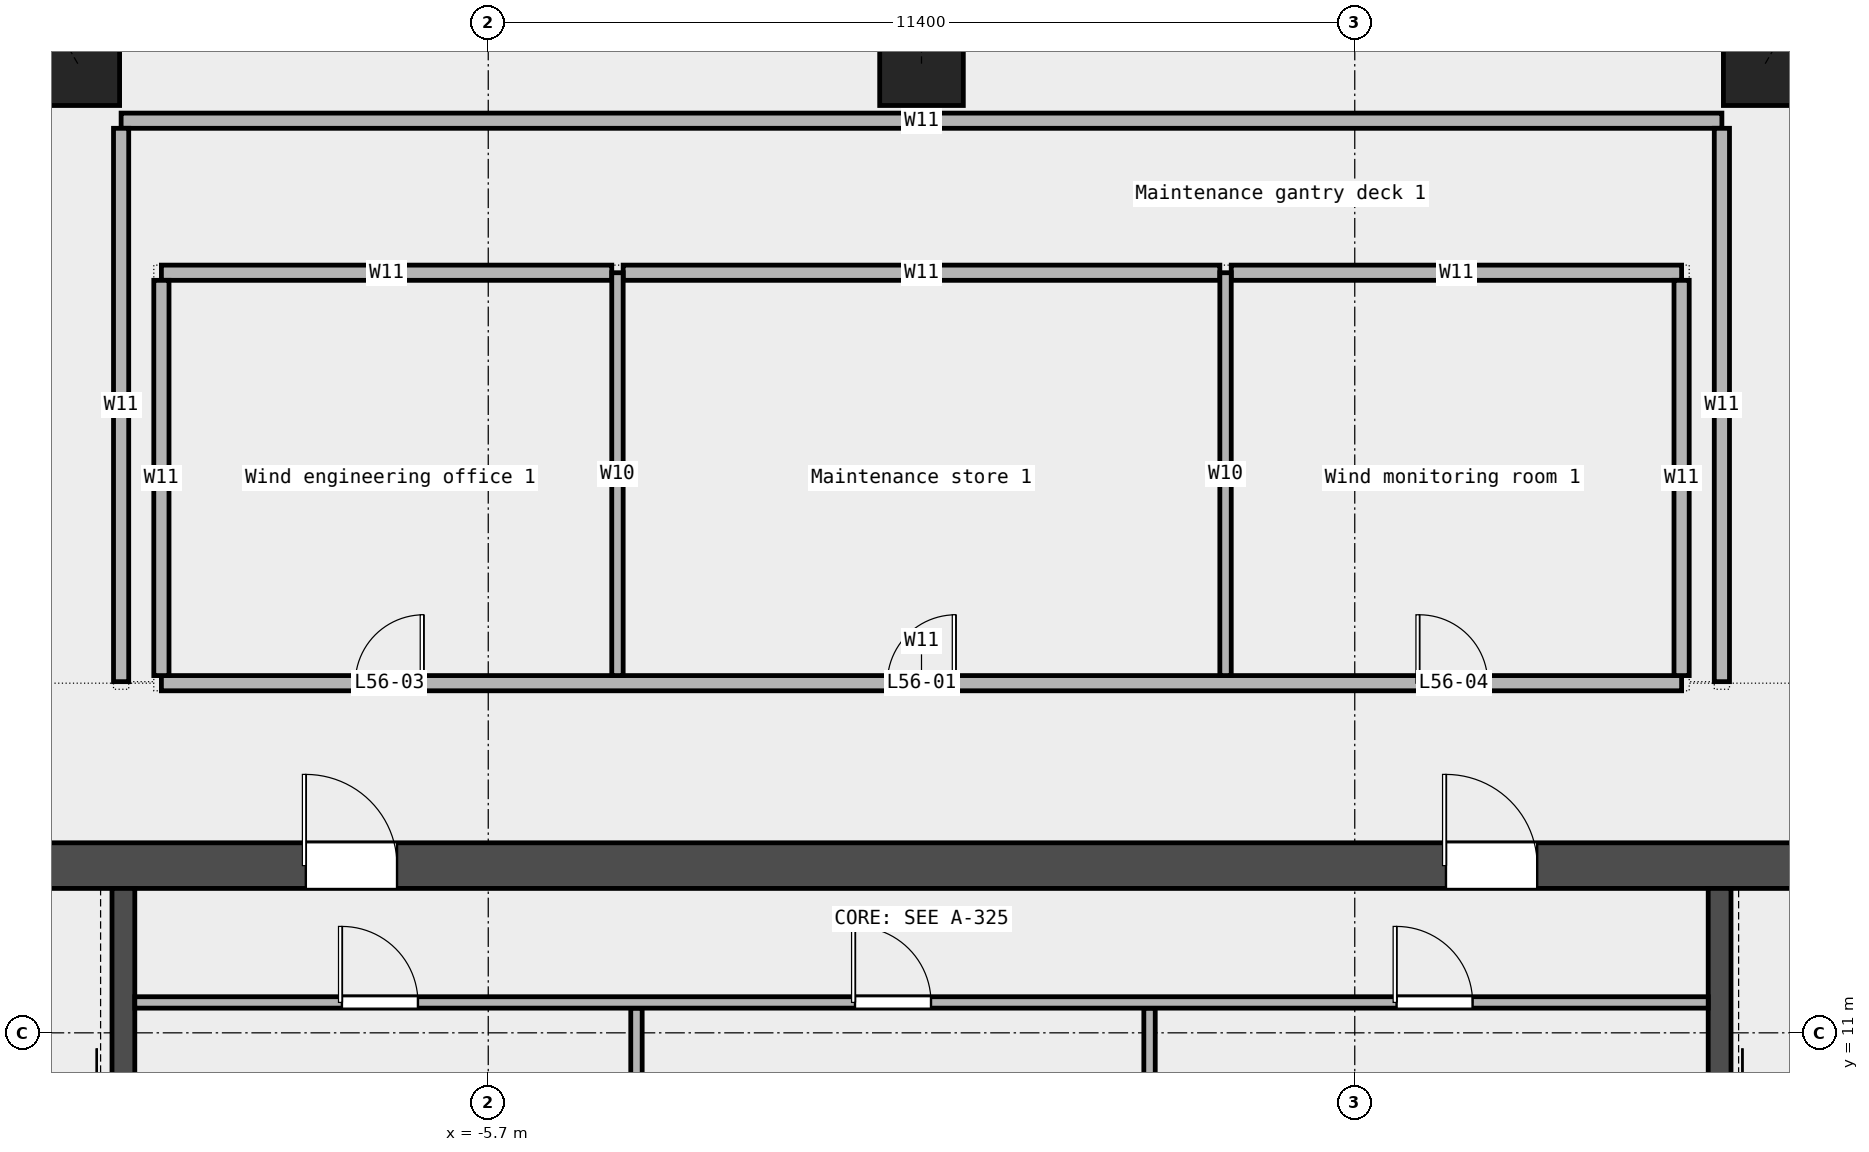
"""IFC4 building model, lengths in metres.
Left out: names, types, materials, properties, quantities, classifications, styles, units other than length and angle.
Written with IfcOpenShell. Run it as: python <this file> out.ifc"""

import sys

from ifc_helpers import new_model, si_unit, direction, frame, frame_2d, origin, origin_2d, place, context, subcontext, project, spatial, rectangle, extrude, element, fill, save


model = new_model("IFC4")
c1 = context("Model", 3, precision=1e-05, world=origin(), true_north=direction((0.0, 1.0)))
c2 = subcontext(c1, "Body", "Model", "MODEL_VIEW")
j1 = project(units=[si_unit("LENGTHUNIT", "METRE"), si_unit("PLANEANGLEUNIT", "RADIAN")], contexts=[c1])
p1 = place(None, origin())
s1 = spatial("IfcSite", under=j1, at=p1, CompositionType="ELEMENT")
p2 = place(p1, origin())
s2 = spatial("IfcBuilding", under=s1, at=p2, CompositionType="ELEMENT")
p3 = place(p2, frame((0.0, 0.0, 259.0)))
s3 = spatial("IfcBuildingStorey", under=s2, at=p3, CompositionType="ELEMENT", Elevation=259.0)
p4 = place(p3, frame((11.1, 23.75, 0.0), z_axis=(0.085054467071, 0.146649781273, 0.985525027224), x_axis=(-0.865037348799, 0.50170746973, 0.0)))
e1 = element("IfcColumn", 1, at=p4, inside=s3, PredefinedType="COLUMN", context=c2, shape_type="SweptSolid", body=[
    extrude(rectangle(XDim=1.1, YDim=1.1, at=origin_2d()), origin(), (0.0, 0.0, 1.0), 8.117),
])
p5 = place(p3, frame((0.0, 23.75, 0.0), z_axis=(0.0, 0.1471831283, 0.989109259255), x_axis=(-1.0, 0.0, 0.0)))
e2 = element("IfcColumn", 2, at=p5, inside=s3, PredefinedType="COLUMN", context=c2, shape_type="SweptSolid", body=[
    extrude(rectangle(XDim=1.1, YDim=1.1, at=origin_2d()), origin(), (0.0, 0.0, 1.0), 8.088),
])
p6 = place(p3, frame((-11.1, 23.75, 0.0), z_axis=(-0.085054467071, 0.146649781273, 0.985525027224), x_axis=(-0.865037348799, -0.50170746973, 0.0)))
e3 = element("IfcColumn", 3, at=p6, inside=s3, PredefinedType="COLUMN", context=c2, shape_type="SweptSolid", body=[
    extrude(rectangle(XDim=1.1, YDim=1.1, at=origin_2d()), origin(), (0.0, 0.0, 1.0), 8.117),
])
p7 = place(p3, frame((-10.0, 15.6, 0.0), z_axis=(0.0, 0.0, 1.0), x_axis=(1.0, 0.0, 0.0)))
e4 = element("IfcWall", 4, at=p7, inside=s3, PredefinedType="PARTITIONING", context=c2, shape_type="SweptSolid", body=[
    extrude(rectangle(XDim=20.0, YDim=0.2, at=frame_2d((10.0, 0.0))), origin(), (0.0, 0.0, 1.0), 8.0),
])
p8 = place(p7, frame((9.55, 0.0, 0.0)))
e5 = element("IfcOpeningElement", 5, at=p8, cuts=e4, PredefinedType="OPENING", context=c2, shape_type="SweptSolid", body=[
    extrude(rectangle(XDim=0.9, YDim=2.1, at=frame_2d((0.45, 1.05))), frame((0.0, 0.112, 0.0), z_axis=(0.0, -1.0, 0.0), x_axis=(1.0, 0.0, 0.0)), (0.0, 0.0, 1.0), 0.224),
])
p9 = place(p7, frame((2.55, 0.0, 0.0)))
e6 = element("IfcOpeningElement", 6, at=p9, cuts=e4, PredefinedType="OPENING", context=c2, shape_type="SweptSolid", body=[
    extrude(rectangle(XDim=0.9, YDim=2.1, at=frame_2d((0.45, 1.05))), frame((0.0, 0.112, 0.0), z_axis=(0.0, -1.0, 0.0), x_axis=(1.0, 0.0, 0.0)), (0.0, 0.0, 1.0), 0.224),
])
p10 = place(p7, frame((16.55, 0.0, 0.0)))
e7 = element("IfcOpeningElement", 7, at=p10, cuts=e4, PredefinedType="OPENING", context=c2, shape_type="SweptSolid", body=[
    extrude(rectangle(XDim=0.9, YDim=2.1, at=frame_2d((0.45, 1.05))), frame((0.0, 0.112, 0.0), z_axis=(0.0, -1.0, 0.0), x_axis=(1.0, 0.0, 0.0)), (0.0, 0.0, 1.0), 0.224),
])
p11 = place(p3, frame((-10.0, 21.0, 0.0), z_axis=(0.0, 0.0, 1.0), x_axis=(1.0, 0.0, 0.0)))
e8 = element("IfcWall", 8, at=p11, inside=s3, PredefinedType="PARTITIONING", context=c2, shape_type="SweptSolid", body=[
    extrude(rectangle(XDim=5.925, YDim=0.2, at=frame_2d((2.962, 0.0))), origin(), (0.0, 0.0, 1.0), 8.0),
])
p12 = place(p3, frame((-3.925, 21.0, 0.0), z_axis=(0.0, 0.0, 1.0), x_axis=(1.0, 0.0, 0.0)))
e9 = element("IfcWall", 9, at=p12, inside=s3, PredefinedType="PARTITIONING", context=c2, shape_type="SweptSolid", body=[
    extrude(rectangle(XDim=7.85, YDim=0.2, at=frame_2d((3.925, 0.0))), origin(), (0.0, 0.0, 1.0), 8.0),
])
p13 = place(p3, frame((4.075, 21.0, 0.0), z_axis=(0.0, 0.0, 1.0), x_axis=(1.0, 0.0, 0.0)))
e10 = element("IfcWall", 10, at=p13, inside=s3, PredefinedType="PARTITIONING", context=c2, shape_type="SweptSolid", body=[
    extrude(rectangle(XDim=5.925, YDim=0.2, at=frame_2d((2.962, 0.0))), origin(), (0.0, 0.0, 1.0), 8.0),
])
p14 = place(p3, frame((-10.53, 23.0, 0.0), z_axis=(0.0, 0.0, 1.0), x_axis=(1.0, 0.0, 0.0)))
e11 = element("IfcWall", 11, at=p14, inside=s3, PredefinedType="PARTITIONING", context=c2, shape_type="SweptSolid", body=[
    extrude(rectangle(XDim=21.06, YDim=0.2, at=frame_2d((10.53, 0.0))), origin(), (0.0, 0.0, 1.0), 8.0),
])
p15 = place(p3, frame((-10.53, 15.62, 0.0), z_axis=(0.0, 0.0, 1.0), x_axis=(0.0, 1.0, 0.0)))
e12 = element("IfcWall", 12, at=p15, inside=s3, PredefinedType="PARTITIONING", context=c2, shape_type="SweptSolid", body=[
    extrude(rectangle(XDim=7.28, YDim=0.2, at=frame_2d((3.64, 0.0))), origin(), (0.0, 0.0, 1.0), 8.0),
])
p16 = place(p3, frame((-10.0, 15.7, 0.0), z_axis=(0.0, 0.0, 1.0), x_axis=(0.0, 1.0, 0.0)))
e13 = element("IfcWall", 13, at=p16, inside=s3, PredefinedType="PARTITIONING", context=c2, shape_type="SweptSolid", body=[
    extrude(rectangle(XDim=5.2, YDim=0.2, at=frame_2d((2.6, 0.0))), origin(), (0.0, 0.0, 1.0), 8.0),
])
for number, where, z_axis, x_axis in (
    (14, (-4.0, 15.7, 0.0), (0.0, 0.0, 1.0), (0.0, 1.0, 0.0)),
    (15, (4.0, 15.7, 0.0), (0.0, 0.0, 1.0), (0.0, 1.0, 0.0)),
):
    element("IfcWall", number, at=place(p3, frame(where, z_axis=z_axis, x_axis=x_axis)), inside=s3, PredefinedType="PARTITIONING", context=c2, shape_type="SweptSolid", body=[
        extrude(rectangle(XDim=5.3, YDim=0.15, at=frame_2d((2.65, 0.0))), origin(), (0.0, 0.0, 1.0), 8.0),
    ])
p17 = place(p3, frame((10.0, 15.7, 0.0), z_axis=(0.0, 0.0, 1.0), x_axis=(0.0, 1.0, 0.0)))
e16 = element("IfcWall", 16, at=p17, inside=s3, PredefinedType="PARTITIONING", context=c2, shape_type="SweptSolid", body=[
    extrude(rectangle(XDim=5.2, YDim=0.2, at=frame_2d((2.6, 0.0))), origin(), (0.0, 0.0, 1.0), 8.0),
])
p18 = place(p3, frame((10.53, 15.62, 0.0), z_axis=(0.0, 0.0, 1.0), x_axis=(0.0, 1.0, 0.0)))
e17 = element("IfcWall", 17, at=p18, inside=s3, PredefinedType="PARTITIONING", context=c2, shape_type="SweptSolid", body=[
    extrude(rectangle(XDim=7.28, YDim=0.2, at=frame_2d((3.64, 0.0))), origin(), (0.0, 0.0, 1.0), 8.0),
])
p19 = place(p3, frame((-14.4, 13.2, 0.0), z_axis=(0.0, 0.0, 1.0), x_axis=(1.0, 0.0, 0.0)))
e18 = element("IfcWall", 18, at=p19, inside=s3, PredefinedType="SHEAR", context=c2, shape_type="SweptSolid", body=[
    extrude(rectangle(XDim=28.8, YDim=0.6, at=frame_2d((14.4, 0.0))), origin(), (0.0, 0.0, 1.0), 8.1),
])
p20 = place(p19, frame((6.3, 0.0, 0.0)))
e19 = element("IfcOpeningElement", 19, at=p20, cuts=e18, PredefinedType="OPENING", context=c2, shape_type="SweptSolid", body=[
    extrude(rectangle(XDim=1.2, YDim=2.1, at=frame_2d((0.6, 1.05))), frame((0.0, 0.312, 0.0), z_axis=(0.0, -1.0, 0.0), x_axis=(1.0, 0.0, 0.0)), (0.0, 0.0, 1.0), 0.624),
])
p21 = place(p19, frame((21.3, 0.0, 0.0)))
e20 = element("IfcOpeningElement", 20, at=p21, cuts=e18, PredefinedType="OPENING", context=c2, shape_type="SweptSolid", body=[
    extrude(rectangle(XDim=1.2, YDim=2.1, at=frame_2d((0.6, 1.05))), frame((0.0, 0.312, 0.0), z_axis=(0.0, -1.0, 0.0), x_axis=(1.0, 0.0, 0.0)), (0.0, 0.0, 1.0), 0.624),
])
for number, where, z_axis, x_axis in (
    (21, (-10.5, 5.25, 0.0), (0.0, 0.0, 1.0), (0.0, 1.0, 0.0)),
    (22, (10.5, 5.25, 0.0), (0.0, 0.0, 1.0), (0.0, 1.0, 0.0)),
):
    element("IfcWall", number, at=place(p3, frame(where, z_axis=z_axis, x_axis=x_axis)), inside=s3, PredefinedType="SHEAR", context=c2, shape_type="SweptSolid", body=[
        extrude(rectangle(XDim=7.65, YDim=0.3, at=frame_2d((3.825, 0.0))), origin(), (0.0, 0.0, 1.0), 8.1),
    ])
for number, where, z_axis, x_axis in (
    (23, (-3.75, 8.55, 0.0), (0.0, 0.0, 1.0), (0.0, 1.0, 0.0)),
    (24, (3.0, 8.55, 0.0), (0.0, 0.0, 1.0), (0.0, 1.0, 0.0)),
):
    element("IfcWall", number, at=place(p3, frame(where, z_axis=z_axis, x_axis=x_axis)), inside=s3, PredefinedType="PARTITIONING", context=c2, shape_type="SweptSolid", body=[
        extrude(rectangle(XDim=2.775, YDim=0.15, at=frame_2d((1.387, 0.0))), origin(), (0.0, 0.0, 1.0), 8.1),
    ])
p22 = place(p3, frame((-10.35, 11.4, 0.0), z_axis=(0.0, 0.0, 1.0), x_axis=(1.0, 0.0, 0.0)))
e25 = element("IfcWall", 25, at=p22, inside=s3, PredefinedType="PARTITIONING", context=c2, shape_type="SweptSolid", body=[
    extrude(rectangle(XDim=20.7, YDim=0.15, at=frame_2d((10.35, 0.0))), origin(), (0.0, 0.0, 1.0), 8.1),
])
p23 = place(p22, frame((2.725, 0.0, 0.0)))
e26 = element("IfcOpeningElement", 26, at=p23, cuts=e25, PredefinedType="OPENING", context=c2, shape_type="SweptSolid", body=[
    extrude(rectangle(XDim=1.0, YDim=2.1, at=frame_2d((0.5, 1.05))), frame((0.0, 0.087, 0.0), z_axis=(0.0, -1.0, 0.0), x_axis=(1.0, 0.0, 0.0)), (0.0, 0.0, 1.0), 0.174),
])
p24 = place(p22, frame((9.475, 0.0, 0.0)))
e27 = element("IfcOpeningElement", 27, at=p24, cuts=e25, PredefinedType="OPENING", context=c2, shape_type="SweptSolid", body=[
    extrude(rectangle(XDim=1.0, YDim=2.1, at=frame_2d((0.5, 1.05))), frame((0.0, 0.087, 0.0), z_axis=(0.0, -1.0, 0.0), x_axis=(1.0, 0.0, 0.0)), (0.0, 0.0, 1.0), 0.174),
])
p25 = place(p22, frame((16.6, 0.0, 0.0)))
e28 = element("IfcOpeningElement", 28, at=p25, cuts=e25, PredefinedType="OPENING", context=c2, shape_type="SweptSolid", body=[
    extrude(rectangle(XDim=1.0, YDim=2.1, at=frame_2d((0.5, 1.05))), frame((0.0, 0.087, 0.0), z_axis=(0.0, -1.0, 0.0), x_axis=(1.0, 0.0, 0.0)), (0.0, 0.0, 1.0), 0.174),
])
p26 = place(p8, origin())
e29 = element("IfcDoor", 29, at=p26, inside=s3, OperationType="SINGLE_SWING_RIGHT", PredefinedType="DOOR", context=c2, shape_type="SweptSolid", body=[
    extrude(rectangle(XDim=0.9, YDim=2.1, at=frame_2d((0.45, 1.05))), frame((0.0, 0.025, 0.0), z_axis=(0.0, -1.0, 0.0), x_axis=(1.0, 0.0, 0.0)), (0.0, 0.0, 1.0), 0.05),
])
fill(e5, e29)
p27 = place(p9, origin())
e30 = element("IfcDoor", 30, at=p27, inside=s3, OperationType="SINGLE_SWING_RIGHT", PredefinedType="DOOR", context=c2, shape_type="SweptSolid", body=[
    extrude(rectangle(XDim=0.9, YDim=2.1, at=frame_2d((0.45, 1.05))), frame((0.0, 0.025, 0.0), z_axis=(0.0, -1.0, 0.0), x_axis=(1.0, 0.0, 0.0)), (0.0, 0.0, 1.0), 0.05),
])
fill(e6, e30)
p28 = place(p10, origin())
e31 = element("IfcDoor", 31, at=p28, inside=s3, OperationType="SINGLE_SWING_LEFT", PredefinedType="DOOR", context=c2, shape_type="SweptSolid", body=[
    extrude(rectangle(XDim=0.9, YDim=2.1, at=frame_2d((0.45, 1.05))), frame((0.0, 0.025, 0.0), z_axis=(0.0, -1.0, 0.0), x_axis=(1.0, 0.0, 0.0)), (0.0, 0.0, 1.0), 0.05),
])
fill(e7, e31)
p29 = place(p23, origin())
e32 = element("IfcDoor", 32, at=p29, inside=s3, OperationType="SINGLE_SWING_LEFT", PredefinedType="DOOR", context=c2, shape_type="SweptSolid", body=[
    extrude(rectangle(XDim=1.0, YDim=2.1, at=frame_2d((0.5, 1.05))), frame((0.0, 0.025, 0.0), z_axis=(0.0, -1.0, 0.0), x_axis=(1.0, 0.0, 0.0)), (0.0, 0.0, 1.0), 0.05),
])
fill(e26, e32)
p30 = place(p24, origin())
e33 = element("IfcDoor", 33, at=p30, inside=s3, OperationType="SINGLE_SWING_LEFT", PredefinedType="DOOR", context=c2, shape_type="SweptSolid", body=[
    extrude(rectangle(XDim=1.0, YDim=2.1, at=frame_2d((0.5, 1.05))), frame((0.0, 0.025, 0.0), z_axis=(0.0, -1.0, 0.0), x_axis=(1.0, 0.0, 0.0)), (0.0, 0.0, 1.0), 0.05),
])
fill(e27, e33)
p31 = place(p25, origin())
e34 = element("IfcDoor", 34, at=p31, inside=s3, OperationType="SINGLE_SWING_LEFT", PredefinedType="DOOR", context=c2, shape_type="SweptSolid", body=[
    extrude(rectangle(XDim=1.0, YDim=2.1, at=frame_2d((0.5, 1.05))), frame((0.0, 0.025, 0.0), z_axis=(0.0, -1.0, 0.0), x_axis=(1.0, 0.0, 0.0)), (0.0, 0.0, 1.0), 0.05),
])
fill(e28, e34)
p32 = place(p20, origin())
e35 = element("IfcDoor", 35, at=p32, inside=s3, OperationType="SINGLE_SWING_LEFT", PredefinedType="DOOR", context=c2, shape_type="SweptSolid", body=[
    extrude(rectangle(XDim=1.2, YDim=2.1, at=frame_2d((0.6, 1.05))), frame((0.0, 0.025, 0.0), z_axis=(0.0, -1.0, 0.0), x_axis=(1.0, 0.0, 0.0)), (0.0, 0.0, 1.0), 0.05),
])
fill(e19, e35)
p33 = place(p21, origin())
e36 = element("IfcDoor", 36, at=p33, inside=s3, OperationType="SINGLE_SWING_RIGHT", PredefinedType="DOOR", context=c2, shape_type="SweptSolid", body=[
    extrude(rectangle(XDim=1.2, YDim=2.1, at=frame_2d((0.6, 1.05))), frame((0.0, 0.025, 0.0), z_axis=(0.0, -1.0, 0.0), x_axis=(1.0, 0.0, 0.0)), (0.0, 0.0, 1.0), 0.05),
])
fill(e20, e36)
save(model, sys.argv[1])
